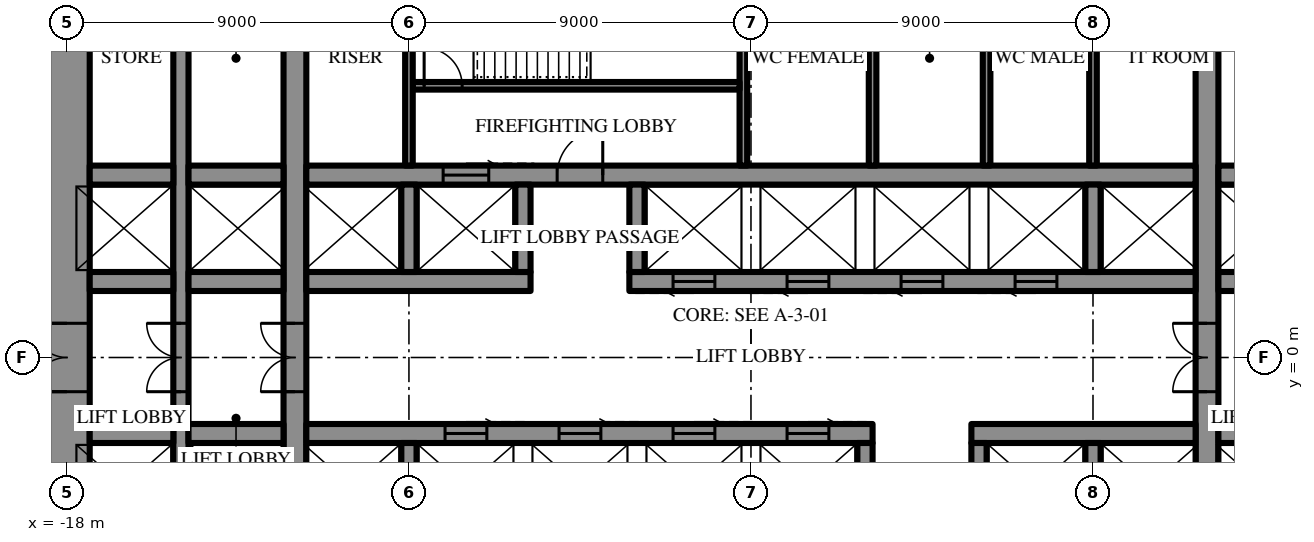
"""IFC4 building model, lengths in metres.
Left out: names, types, materials, properties, quantities, classifications, styles, units other than length and angle.
Written with IfcOpenShell. Run it as: python <this file> out.ifc"""

import sys

from ifc_helpers import new_model, si_unit, direction, frame, frame_2d, origin, place, context, subcontext, project, spatial, rectangle, extrude, element, fill, save


model = new_model("IFC4")
c1 = context("Model", 3, precision=1e-05, world=origin(), true_north=direction((0.0, 1.0)))
c2 = subcontext(c1, "Body", "Model", "MODEL_VIEW")
j1 = project(units=[si_unit("LENGTHUNIT", "METRE"), si_unit("PLANEANGLEUNIT", "RADIAN")], contexts=[c1])
p1 = place(None, origin())
s1 = spatial("IfcSite", under=j1, at=p1, CompositionType="ELEMENT")
p2 = place(p1, origin())
s2 = spatial("IfcBuilding", under=s1, at=p2, CompositionType="ELEMENT")
p3 = place(p2, frame((0.0, 0.0, 57.1)))
s3 = spatial("IfcBuildingStorey", under=s2, at=p3, CompositionType="ELEMENT", Elevation=57.1)
p4 = place(p3, frame((-18.0, 10.7, 0.0), z_axis=(0.0, 0.0, 1.0), x_axis=(0.0, -1.0, 0.0)))
e1 = element("IfcWall", 1, at=p4, inside=s3, PredefinedType="SHEAR", context=c2, shape_type="SweptSolid", body=[
    extrude(rectangle(XDim=21.4, YDim=1.2, at=frame_2d((10.7, 0.0))), origin(), (0.0, 0.0, 1.0), 4.2),
])
p5 = place(p4, frame((9.8, 0.0, 0.0)))
e2 = element("IfcOpeningElement", 2, at=p5, cuts=e1, PredefinedType="OPENING", context=c2, shape_type="SweptSolid", body=[
    extrude(rectangle(XDim=1.8, YDim=2.4, at=frame_2d((0.9, 1.2))), frame((0.0, 0.61, 0.0), z_axis=(0.0, -1.0, 0.0), x_axis=(1.0, 0.0, 0.0)), (0.0, 0.0, 1.0), 1.22),
])
p6 = place(p3, frame((12.0, -10.7, 0.0), z_axis=(0.0, 0.0, 1.0), x_axis=(0.0, 1.0, 0.0)))
e3 = element("IfcWall", 3, at=p6, inside=s3, PredefinedType="SHEAR", context=c2, shape_type="SweptSolid", body=[
    extrude(rectangle(XDim=21.4, YDim=0.6, at=frame_2d((10.7, 0.0))), origin(), (0.0, 0.0, 1.0), 4.2),
])
p7 = place(p6, frame((9.8, 0.0, 0.0)))
e4 = element("IfcOpeningElement", 4, at=p7, cuts=e3, PredefinedType="OPENING", context=c2, shape_type="SweptSolid", body=[
    extrude(rectangle(XDim=1.8, YDim=2.4, at=frame_2d((0.9, 1.2))), frame((0.0, 0.31, 0.0), z_axis=(0.0, -1.0, 0.0), x_axis=(1.0, 0.0, 0.0)), (0.0, 0.0, 1.0), 0.62),
])
p8 = place(p3, frame((-12.0, -10.7, 0.0), z_axis=(0.0, 0.0, 1.0), x_axis=(0.0, 1.0, 0.0)))
e5 = element("IfcWall", 5, at=p8, inside=s3, PredefinedType="SHEAR", context=c2, shape_type="SweptSolid", body=[
    extrude(rectangle(XDim=21.4, YDim=0.6, at=frame_2d((10.7, 0.0))), origin(), (0.0, 0.0, 1.0), 4.2),
])
p9 = place(p8, frame((9.8, 0.0, 0.0)))
e6 = element("IfcOpeningElement", 6, at=p9, cuts=e5, PredefinedType="OPENING", context=c2, shape_type="SweptSolid", body=[
    extrude(rectangle(XDim=1.8, YDim=2.4, at=frame_2d((0.9, 1.2))), frame((0.0, 0.31, 0.0), z_axis=(0.0, -1.0, 0.0), x_axis=(1.0, 0.0, 0.0)), (0.0, 0.0, 1.0), 0.62),
])
p10 = place(p3, frame((-15.0, -10.7, 0.0), z_axis=(0.0, 0.0, 1.0), x_axis=(0.0, 1.0, 0.0)))
e7 = element("IfcWall", 7, at=p10, inside=s3, PredefinedType="SHEAR", context=c2, shape_type="SweptSolid", body=[
    extrude(rectangle(XDim=21.4, YDim=0.4, at=frame_2d((10.7, 0.0))), origin(), (0.0, 0.0, 1.0), 4.2),
])
p11 = place(p10, frame((9.8, 0.0, 0.0)))
e8 = element("IfcOpeningElement", 8, at=p11, cuts=e7, PredefinedType="OPENING", context=c2, shape_type="SweptSolid", body=[
    extrude(rectangle(XDim=1.8, YDim=2.4, at=frame_2d((0.9, 1.2))), frame((0.0, 0.21, 0.0), z_axis=(0.0, -1.0, 0.0), x_axis=(1.0, 0.0, 0.0)), (0.0, 0.0, 1.0), 0.42),
])
p12 = place(p3, frame((-17.4, 2.0, 0.0), z_axis=(0.0, 0.0, 1.0), x_axis=(1.0, 0.0, 0.0)))
e9 = element("IfcWall", 9, at=p12, inside=s3, PredefinedType="SHEAR", context=c2, shape_type="SweptSolid", body=[
    extrude(rectangle(XDim=2.2, YDim=0.5, at=frame_2d((1.1, 0.0))), origin(), (0.0, 0.0, 1.0), 4.2),
])
p13 = place(p3, frame((-14.8, 2.0, 0.0), z_axis=(0.0, 0.0, 1.0), x_axis=(1.0, 0.0, 0.0)))
e10 = element("IfcWall", 10, at=p13, inside=s3, PredefinedType="SHEAR", context=c2, shape_type="SweptSolid", body=[
    extrude(rectangle(XDim=2.5, YDim=0.5, at=frame_2d((1.25, 0.0))), origin(), (0.0, 0.0, 1.0), 4.2),
])
p14 = place(p3, frame((-11.7, 2.0, 0.0), z_axis=(0.0, 0.0, 1.0), x_axis=(1.0, 0.0, 0.0)))
e11 = element("IfcWall", 11, at=p14, inside=s3, PredefinedType="SHEAR", context=c2, shape_type="SweptSolid", body=[
    extrude(rectangle(XDim=5.9, YDim=0.5, at=frame_2d((2.95, 0.0))), origin(), (0.0, 0.0, 1.0), 4.2),
])
p15 = place(p3, frame((-3.2, 2.0, 0.0), z_axis=(0.0, 0.0, 1.0), x_axis=(1.0, 0.0, 0.0)))
e12 = element("IfcWall", 12, at=p15, inside=s3, PredefinedType="SHEAR", context=c2, shape_type="SweptSolid", body=[
    extrude(rectangle(XDim=14.9, YDim=0.5, at=frame_2d((7.45, 0.0))), origin(), (0.0, 0.0, 1.0), 4.2),
])
p16 = place(p15, frame((1.15, 0.0, 0.0)))
e13 = element("IfcOpeningElement", 13, at=p16, cuts=e12, PredefinedType="OPENING", context=c2, shape_type="SweptSolid", body=[
    extrude(rectangle(XDim=1.1, YDim=2.2, at=frame_2d((0.55, 1.1))), frame((0.0, 0.26, 0.0), z_axis=(0.0, -1.0, 0.0), x_axis=(1.0, 0.0, 0.0)), (0.0, 0.0, 1.0), 0.52),
])
p17 = place(p15, frame((4.15, 0.0, 0.0)))
e14 = element("IfcOpeningElement", 14, at=p17, cuts=e12, PredefinedType="OPENING", context=c2, shape_type="SweptSolid", body=[
    extrude(rectangle(XDim=1.1, YDim=2.2, at=frame_2d((0.55, 1.1))), frame((0.0, 0.26, 0.0), z_axis=(0.0, -1.0, 0.0), x_axis=(1.0, 0.0, 0.0)), (0.0, 0.0, 1.0), 0.52),
])
p18 = place(p15, frame((7.15, 0.0, 0.0)))
e15 = element("IfcOpeningElement", 15, at=p18, cuts=e12, PredefinedType="OPENING", context=c2, shape_type="SweptSolid", body=[
    extrude(rectangle(XDim=1.1, YDim=2.2, at=frame_2d((0.55, 1.1))), frame((0.0, 0.26, 0.0), z_axis=(0.0, -1.0, 0.0), x_axis=(1.0, 0.0, 0.0)), (0.0, 0.0, 1.0), 0.52),
])
p19 = place(p15, frame((10.15, 0.0, 0.0)))
e16 = element("IfcOpeningElement", 16, at=p19, cuts=e12, PredefinedType="OPENING", context=c2, shape_type="SweptSolid", body=[
    extrude(rectangle(XDim=1.1, YDim=2.2, at=frame_2d((0.55, 1.1))), frame((0.0, 0.26, 0.0), z_axis=(0.0, -1.0, 0.0), x_axis=(1.0, 0.0, 0.0)), (0.0, 0.0, 1.0), 0.52),
])
p20 = place(p3, frame((12.3, 2.0, 0.0), z_axis=(0.0, 0.0, 1.0), x_axis=(1.0, 0.0, 0.0)))
e17 = element("IfcWall", 17, at=p20, inside=s3, PredefinedType="SHEAR", context=c2, shape_type="SweptSolid", body=[
    extrude(rectangle(XDim=2.5, YDim=0.5, at=frame_2d((1.25, 0.0))), origin(), (0.0, 0.0, 1.0), 4.2),
])
p21 = place(p3, frame((-17.4, 4.8, 0.0), z_axis=(0.0, 0.0, 1.0), x_axis=(1.0, 0.0, 0.0)))
e18 = element("IfcWall", 18, at=p21, inside=s3, PredefinedType="SHEAR", context=c2, shape_type="SweptSolid", body=[
    extrude(rectangle(XDim=2.2, YDim=0.5, at=frame_2d((1.1, 0.0))), origin(), (0.0, 0.0, 1.0), 4.2),
])
p22 = place(p3, frame((-14.8, 4.8, 0.0), z_axis=(0.0, 0.0, 1.0), x_axis=(1.0, 0.0, 0.0)))
e19 = element("IfcWall", 19, at=p22, inside=s3, PredefinedType="SHEAR", context=c2, shape_type="SweptSolid", body=[
    extrude(rectangle(XDim=2.5, YDim=0.5, at=frame_2d((1.25, 0.0))), origin(), (0.0, 0.0, 1.0), 4.2),
])
p23 = place(p3, frame((-11.7, 4.8, 0.0), z_axis=(0.0, 0.0, 1.0), x_axis=(1.0, 0.0, 0.0)))
e20 = element("IfcWall", 20, at=p23, inside=s3, PredefinedType="SHEAR", context=c2, shape_type="SweptSolid", body=[
    extrude(rectangle(XDim=23.4, YDim=0.5, at=frame_2d((11.7, 0.0))), origin(), (0.0, 0.0, 1.0), 4.2),
])
p24 = place(p23, frame((6.6, 0.0, 0.0)))
e21 = element("IfcOpeningElement", 21, at=p24, cuts=e20, PredefinedType="OPENING", context=c2, shape_type="SweptSolid", body=[
    extrude(rectangle(XDim=1.2, YDim=2.2, at=frame_2d((0.6, 1.1))), frame((0.0, 0.26, 0.0), z_axis=(0.0, -1.0, 0.0), x_axis=(1.0, 0.0, 0.0)), (0.0, 0.0, 1.0), 0.52),
])
p25 = place(p23, frame((3.6, 0.0, 0.0)))
e22 = element("IfcOpeningElement", 22, at=p25, cuts=e20, PredefinedType="OPENING", context=c2, shape_type="SweptSolid", body=[
    extrude(rectangle(XDim=1.2, YDim=2.2, at=frame_2d((0.6, 1.1))), frame((0.0, 0.26, 0.0), z_axis=(0.0, -1.0, 0.0), x_axis=(1.0, 0.0, 0.0)), (0.0, 0.0, 1.0), 0.52),
])
p26 = place(p3, frame((12.3, 4.8, 0.0), z_axis=(0.0, 0.0, 1.0), x_axis=(1.0, 0.0, 0.0)))
e23 = element("IfcWall", 23, at=p26, inside=s3, PredefinedType="SHEAR", context=c2, shape_type="SweptSolid", body=[
    extrude(rectangle(XDim=2.5, YDim=0.5, at=frame_2d((1.25, 0.0))), origin(), (0.0, 0.0, 1.0), 4.2),
])
for number, where, z_axis, x_axis in (
    (24, (-9.0, 2.25, 0.0), (0.0, 0.0, 1.0), (0.0, 1.0, 0.0)),
    (25, (-6.0, 2.25, 0.0), (0.0, 0.0, 1.0), (0.0, 1.0, 0.0)),
    (26, (-3.0, 2.25, 0.0), (0.0, 0.0, 1.0), (0.0, 1.0, 0.0)),
    (27, (9.0, 2.25, 0.0), (0.0, 0.0, 1.0), (0.0, 1.0, 0.0)),
):
    element("IfcWall", number, at=place(p3, frame(where, z_axis=z_axis, x_axis=x_axis)), inside=s3, PredefinedType="SHEAR", context=c2, shape_type="SweptSolid", body=[
        extrude(rectangle(XDim=2.3, YDim=0.4, at=frame_2d((1.15, 0.0))), origin(), (0.0, 0.0, 1.0), 4.2),
    ])
p27 = place(p3, frame((-0.2, 5.05, 0.0), z_axis=(0.0, 0.0, 1.0), x_axis=(0.0, 1.0, 0.0)))
e28 = element("IfcWall", 28, at=p27, inside=s3, PredefinedType="SHEAR", context=c2, shape_type="SweptSolid", body=[
    extrude(rectangle(XDim=5.65, YDim=0.2, at=frame_2d((2.825, 0.0))), origin(), (0.0, 0.0, 1.0), 4.2),
])
p28 = place(p3, frame((-8.9, 7.15, 0.0), z_axis=(0.0, 0.0, 1.0), x_axis=(1.0, 0.0, 0.0)))
e29 = element("IfcWall", 29, at=p28, inside=s3, PredefinedType="SHEAR", context=c2, shape_type="SweptSolid", body=[
    extrude(rectangle(XDim=8.6, YDim=0.2, at=frame_2d((4.3, 0.0))), origin(), (0.0, 0.0, 1.0), 4.2),
])
p29 = place(p28, frame((0.3, 0.0, 0.0)))
e30 = element("IfcOpeningElement", 30, at=p29, cuts=e29, PredefinedType="OPENING", context=c2, shape_type="SweptSolid", body=[
    extrude(rectangle(XDim=1.0, YDim=2.2, at=frame_2d((0.5, 1.1))), frame((0.0, 0.11, 0.0), z_axis=(0.0, -1.0, 0.0), x_axis=(1.0, 0.0, 0.0)), (0.0, 0.0, 1.0), 0.22),
])
p30 = place(p3, frame((14.8, -2.0, 0.0), z_axis=(0.0, 0.0, 1.0), x_axis=(-1.0, 0.0, 0.0)))
e31 = element("IfcWall", 31, at=p30, inside=s3, PredefinedType="SHEAR", context=c2, shape_type="SweptSolid", body=[
    extrude(rectangle(XDim=2.5, YDim=0.5, at=frame_2d((1.25, 0.0))), origin(), (0.0, 0.0, 1.0), 4.2),
])
p31 = place(p3, frame((11.7, -2.0, 0.0), z_axis=(0.0, 0.0, 1.0), x_axis=(-1.0, 0.0, 0.0)))
e32 = element("IfcWall", 32, at=p31, inside=s3, PredefinedType="SHEAR", context=c2, shape_type="SweptSolid", body=[
    extrude(rectangle(XDim=5.9, YDim=0.5, at=frame_2d((2.95, 0.0))), origin(), (0.0, 0.0, 1.0), 4.2),
])
p32 = place(p3, frame((3.2, -2.0, 0.0), z_axis=(0.0, 0.0, 1.0), x_axis=(-1.0, 0.0, 0.0)))
e33 = element("IfcWall", 33, at=p32, inside=s3, PredefinedType="SHEAR", context=c2, shape_type="SweptSolid", body=[
    extrude(rectangle(XDim=14.9, YDim=0.5, at=frame_2d((7.45, 0.0))), origin(), (0.0, 0.0, 1.0), 4.2),
])
p33 = place(p32, frame((1.15, 0.0, 0.0)))
e34 = element("IfcOpeningElement", 34, at=p33, cuts=e33, PredefinedType="OPENING", context=c2, shape_type="SweptSolid", body=[
    extrude(rectangle(XDim=1.1, YDim=2.2, at=frame_2d((0.55, 1.1))), frame((0.0, 0.26, 0.0), z_axis=(0.0, -1.0, 0.0), x_axis=(1.0, 0.0, 0.0)), (0.0, 0.0, 1.0), 0.52),
])
p34 = place(p32, frame((4.15, 0.0, 0.0)))
e35 = element("IfcOpeningElement", 35, at=p34, cuts=e33, PredefinedType="OPENING", context=c2, shape_type="SweptSolid", body=[
    extrude(rectangle(XDim=1.1, YDim=2.2, at=frame_2d((0.55, 1.1))), frame((0.0, 0.26, 0.0), z_axis=(0.0, -1.0, 0.0), x_axis=(1.0, 0.0, 0.0)), (0.0, 0.0, 1.0), 0.52),
])
p35 = place(p32, frame((7.15, 0.0, 0.0)))
e36 = element("IfcOpeningElement", 36, at=p35, cuts=e33, PredefinedType="OPENING", context=c2, shape_type="SweptSolid", body=[
    extrude(rectangle(XDim=1.1, YDim=2.2, at=frame_2d((0.55, 1.1))), frame((0.0, 0.26, 0.0), z_axis=(0.0, -1.0, 0.0), x_axis=(1.0, 0.0, 0.0)), (0.0, 0.0, 1.0), 0.52),
])
p36 = place(p32, frame((10.15, 0.0, 0.0)))
e37 = element("IfcOpeningElement", 37, at=p36, cuts=e33, PredefinedType="OPENING", context=c2, shape_type="SweptSolid", body=[
    extrude(rectangle(XDim=1.1, YDim=2.2, at=frame_2d((0.55, 1.1))), frame((0.0, 0.26, 0.0), z_axis=(0.0, -1.0, 0.0), x_axis=(1.0, 0.0, 0.0)), (0.0, 0.0, 1.0), 0.52),
])
p37 = place(p3, frame((-12.3, -2.0, 0.0), z_axis=(0.0, 0.0, 1.0), x_axis=(-1.0, 0.0, 0.0)))
e38 = element("IfcWall", 38, at=p37, inside=s3, PredefinedType="SHEAR", context=c2, shape_type="SweptSolid", body=[
    extrude(rectangle(XDim=2.5, YDim=0.5, at=frame_2d((1.25, 0.0))), origin(), (0.0, 0.0, 1.0), 4.2),
])
p38 = place(p3, frame((-15.2, -2.0, 0.0), z_axis=(0.0, 0.0, 1.0), x_axis=(-1.0, 0.0, 0.0)))
e39 = element("IfcWall", 39, at=p38, inside=s3, PredefinedType="SHEAR", context=c2, shape_type="SweptSolid", body=[
    extrude(rectangle(XDim=2.2, YDim=0.5, at=frame_2d((1.1, 0.0))), origin(), (0.0, 0.0, 1.0), 4.2),
])
for number, where, z_axis, x_axis in (
    (40, (9.0, -2.25, 0.0), (0.0, 0.0, 1.0), (0.0, -1.0, 0.0)),
    (41, (6.0, -2.25, 0.0), (0.0, 0.0, 1.0), (0.0, -1.0, 0.0)),
    (42, (3.0, -2.25, 0.0), (0.0, 0.0, 1.0), (0.0, -1.0, 0.0)),
    (43, (-9.0, -2.25, 0.0), (0.0, 0.0, 1.0), (0.0, -1.0, 0.0)),
):
    element("IfcWall", number, at=place(p3, frame(where, z_axis=z_axis, x_axis=x_axis)), inside=s3, PredefinedType="SHEAR", context=c2, shape_type="SweptSolid", body=[
        extrude(rectangle(XDim=2.3, YDim=0.4, at=frame_2d((1.15, 0.0))), origin(), (0.0, 0.0, 1.0), 4.2),
    ])
for number, where, z_axis, x_axis in (
    (44, (-9.0, 5.05, 0.0), (0.0, 0.0, 1.0), (0.0, 1.0, 0.0)),
    (45, (9.0, 5.05, 0.0), (0.0, 0.0, 1.0), (0.0, 1.0, 0.0)),
    (46, (3.2, 5.05, 0.0), (0.0, 0.0, 1.0), (0.0, 1.0, 0.0)),
    (47, (6.2, 5.05, 0.0), (0.0, 0.0, 1.0), (0.0, 1.0, 0.0)),
):
    element("IfcWall", number, at=place(p3, frame(where, z_axis=z_axis, x_axis=x_axis)), inside=s3, PredefinedType="PARTITIONING", context=c2, shape_type="SweptSolid", body=[
        extrude(rectangle(XDim=5.65, YDim=0.2, at=frame_2d((2.825, 0.0))), origin(), (0.0, 0.0, 1.0), 4.0),
    ])
p39 = place(p5, frame((1.8, 0.0, 0.0), z_axis=(0.0, 0.0, 1.0), x_axis=(-1.0, 0.0, 0.0)))
e48 = element("IfcDoor", 48, at=p39, inside=s3, OperationType="DOUBLE_DOOR_SINGLE_SWING", PredefinedType="DOOR", context=c2, shape_type="SweptSolid", body=[
    extrude(rectangle(XDim=1.8, YDim=2.4, at=frame_2d((0.9, 1.2))), frame((0.0, 0.025, 0.0), z_axis=(0.0, -1.0, 0.0), x_axis=(1.0, 0.0, 0.0)), (0.0, 0.0, 1.0), 0.05),
])
fill(e2, e48)
p40 = place(p24, origin())
e49 = element("IfcDoor", 49, at=p40, inside=s3, OperationType="SINGLE_SWING_LEFT", PredefinedType="DOOR", context=c2, shape_type="SweptSolid", body=[
    extrude(rectangle(XDim=1.2, YDim=2.2, at=frame_2d((0.6, 1.1))), frame((0.0, 0.025, 0.0), z_axis=(0.0, -1.0, 0.0), x_axis=(1.0, 0.0, 0.0)), (0.0, 0.0, 1.0), 0.05),
])
fill(e21, e49)
p41 = place(p29, origin())
e50 = element("IfcDoor", 50, at=p41, inside=s3, OperationType="SINGLE_SWING_RIGHT", PredefinedType="DOOR", context=c2, shape_type="SweptSolid", body=[
    extrude(rectangle(XDim=1.0, YDim=2.2, at=frame_2d((0.5, 1.1))), frame((0.0, 0.025, 0.0), z_axis=(0.0, -1.0, 0.0), x_axis=(1.0, 0.0, 0.0)), (0.0, 0.0, 1.0), 0.05),
])
fill(e30, e50)
p42 = place(p7, origin())
e51 = element("IfcDoor", 51, at=p42, inside=s3, OperationType="DOUBLE_DOOR_SINGLE_SWING", PredefinedType="DOOR", context=c2, shape_type="SweptSolid", body=[
    extrude(rectangle(XDim=1.8, YDim=2.4, at=frame_2d((0.9, 1.2))), frame((0.0, 0.025, 0.0), z_axis=(0.0, -1.0, 0.0), x_axis=(1.0, 0.0, 0.0)), (0.0, 0.0, 1.0), 0.05),
])
fill(e4, e51)
p43 = place(p9, origin())
e52 = element("IfcDoor", 52, at=p43, inside=s3, OperationType="DOUBLE_DOOR_SINGLE_SWING", PredefinedType="DOOR", context=c2, shape_type="SweptSolid", body=[
    extrude(rectangle(XDim=1.8, YDim=2.4, at=frame_2d((0.9, 1.2))), frame((0.0, 0.025, 0.0), z_axis=(0.0, -1.0, 0.0), x_axis=(1.0, 0.0, 0.0)), (0.0, 0.0, 1.0), 0.05),
])
fill(e6, e52)
p44 = place(p11, origin())
e53 = element("IfcDoor", 53, at=p44, inside=s3, OperationType="DOUBLE_DOOR_SINGLE_SWING", PredefinedType="DOOR", context=c2, shape_type="SweptSolid", body=[
    extrude(rectangle(XDim=1.8, YDim=2.4, at=frame_2d((0.9, 1.2))), frame((0.0, 0.025, 0.0), z_axis=(0.0, -1.0, 0.0), x_axis=(1.0, 0.0, 0.0)), (0.0, 0.0, 1.0), 0.05),
])
fill(e8, e53)
p45 = place(p25, origin())
e54 = element("IfcDoor", 54, at=p45, inside=s3, OperationType="SLIDING_TO_LEFT", PredefinedType="DOOR", context=c2, shape_type="SweptSolid", body=[
    extrude(rectangle(XDim=1.2, YDim=2.2, at=frame_2d((0.6, 1.1))), frame((0.0, 0.025, 0.0), z_axis=(0.0, -1.0, 0.0), x_axis=(1.0, 0.0, 0.0)), (0.0, 0.0, 1.0), 0.05),
])
fill(e22, e54)
p46 = place(p16, frame((1.1, 0.0, 0.0), z_axis=(0.0, 0.0, 1.0), x_axis=(-1.0, 0.0, 0.0)))
e55 = element("IfcDoor", 55, at=p46, inside=s3, OperationType="SLIDING_TO_LEFT", PredefinedType="DOOR", context=c2, shape_type="SweptSolid", body=[
    extrude(rectangle(XDim=1.1, YDim=2.2, at=frame_2d((0.55, 1.1))), frame((0.0, 0.025, 0.0), z_axis=(0.0, -1.0, 0.0), x_axis=(1.0, 0.0, 0.0)), (0.0, 0.0, 1.0), 0.05),
])
fill(e13, e55)
p47 = place(p17, frame((1.1, 0.0, 0.0), z_axis=(0.0, 0.0, 1.0), x_axis=(-1.0, 0.0, 0.0)))
e56 = element("IfcDoor", 56, at=p47, inside=s3, OperationType="SLIDING_TO_LEFT", PredefinedType="DOOR", context=c2, shape_type="SweptSolid", body=[
    extrude(rectangle(XDim=1.1, YDim=2.2, at=frame_2d((0.55, 1.1))), frame((0.0, 0.025, 0.0), z_axis=(0.0, -1.0, 0.0), x_axis=(1.0, 0.0, 0.0)), (0.0, 0.0, 1.0), 0.05),
])
fill(e14, e56)
p48 = place(p18, frame((1.1, 0.0, 0.0), z_axis=(0.0, 0.0, 1.0), x_axis=(-1.0, 0.0, 0.0)))
e57 = element("IfcDoor", 57, at=p48, inside=s3, OperationType="SLIDING_TO_LEFT", PredefinedType="DOOR", context=c2, shape_type="SweptSolid", body=[
    extrude(rectangle(XDim=1.1, YDim=2.2, at=frame_2d((0.55, 1.1))), frame((0.0, 0.025, 0.0), z_axis=(0.0, -1.0, 0.0), x_axis=(1.0, 0.0, 0.0)), (0.0, 0.0, 1.0), 0.05),
])
fill(e15, e57)
p49 = place(p19, frame((1.1, 0.0, 0.0), z_axis=(0.0, 0.0, 1.0), x_axis=(-1.0, 0.0, 0.0)))
e58 = element("IfcDoor", 58, at=p49, inside=s3, OperationType="SLIDING_TO_LEFT", PredefinedType="DOOR", context=c2, shape_type="SweptSolid", body=[
    extrude(rectangle(XDim=1.1, YDim=2.2, at=frame_2d((0.55, 1.1))), frame((0.0, 0.025, 0.0), z_axis=(0.0, -1.0, 0.0), x_axis=(1.0, 0.0, 0.0)), (0.0, 0.0, 1.0), 0.05),
])
fill(e16, e58)
p50 = place(p33, frame((1.1, 0.0, 0.0), z_axis=(0.0, 0.0, 1.0), x_axis=(-1.0, 0.0, 0.0)))
e59 = element("IfcDoor", 59, at=p50, inside=s3, OperationType="SLIDING_TO_LEFT", PredefinedType="DOOR", context=c2, shape_type="SweptSolid", body=[
    extrude(rectangle(XDim=1.1, YDim=2.2, at=frame_2d((0.55, 1.1))), frame((0.0, 0.025, 0.0), z_axis=(0.0, -1.0, 0.0), x_axis=(1.0, 0.0, 0.0)), (0.0, 0.0, 1.0), 0.05),
])
fill(e34, e59)
p51 = place(p34, frame((1.1, 0.0, 0.0), z_axis=(0.0, 0.0, 1.0), x_axis=(-1.0, 0.0, 0.0)))
e60 = element("IfcDoor", 60, at=p51, inside=s3, OperationType="SLIDING_TO_LEFT", PredefinedType="DOOR", context=c2, shape_type="SweptSolid", body=[
    extrude(rectangle(XDim=1.1, YDim=2.2, at=frame_2d((0.55, 1.1))), frame((0.0, 0.025, 0.0), z_axis=(0.0, -1.0, 0.0), x_axis=(1.0, 0.0, 0.0)), (0.0, 0.0, 1.0), 0.05),
])
fill(e35, e60)
p52 = place(p35, frame((1.1, 0.0, 0.0), z_axis=(0.0, 0.0, 1.0), x_axis=(-1.0, 0.0, 0.0)))
e61 = element("IfcDoor", 61, at=p52, inside=s3, OperationType="SLIDING_TO_LEFT", PredefinedType="DOOR", context=c2, shape_type="SweptSolid", body=[
    extrude(rectangle(XDim=1.1, YDim=2.2, at=frame_2d((0.55, 1.1))), frame((0.0, 0.025, 0.0), z_axis=(0.0, -1.0, 0.0), x_axis=(1.0, 0.0, 0.0)), (0.0, 0.0, 1.0), 0.05),
])
fill(e36, e61)
p53 = place(p36, frame((1.1, 0.0, 0.0), z_axis=(0.0, 0.0, 1.0), x_axis=(-1.0, 0.0, 0.0)))
e62 = element("IfcDoor", 62, at=p53, inside=s3, OperationType="SLIDING_TO_LEFT", PredefinedType="DOOR", context=c2, shape_type="SweptSolid", body=[
    extrude(rectangle(XDim=1.1, YDim=2.2, at=frame_2d((0.55, 1.1))), frame((0.0, 0.025, 0.0), z_axis=(0.0, -1.0, 0.0), x_axis=(1.0, 0.0, 0.0)), (0.0, 0.0, 1.0), 0.05),
])
fill(e37, e62)
save(model, sys.argv[1])
